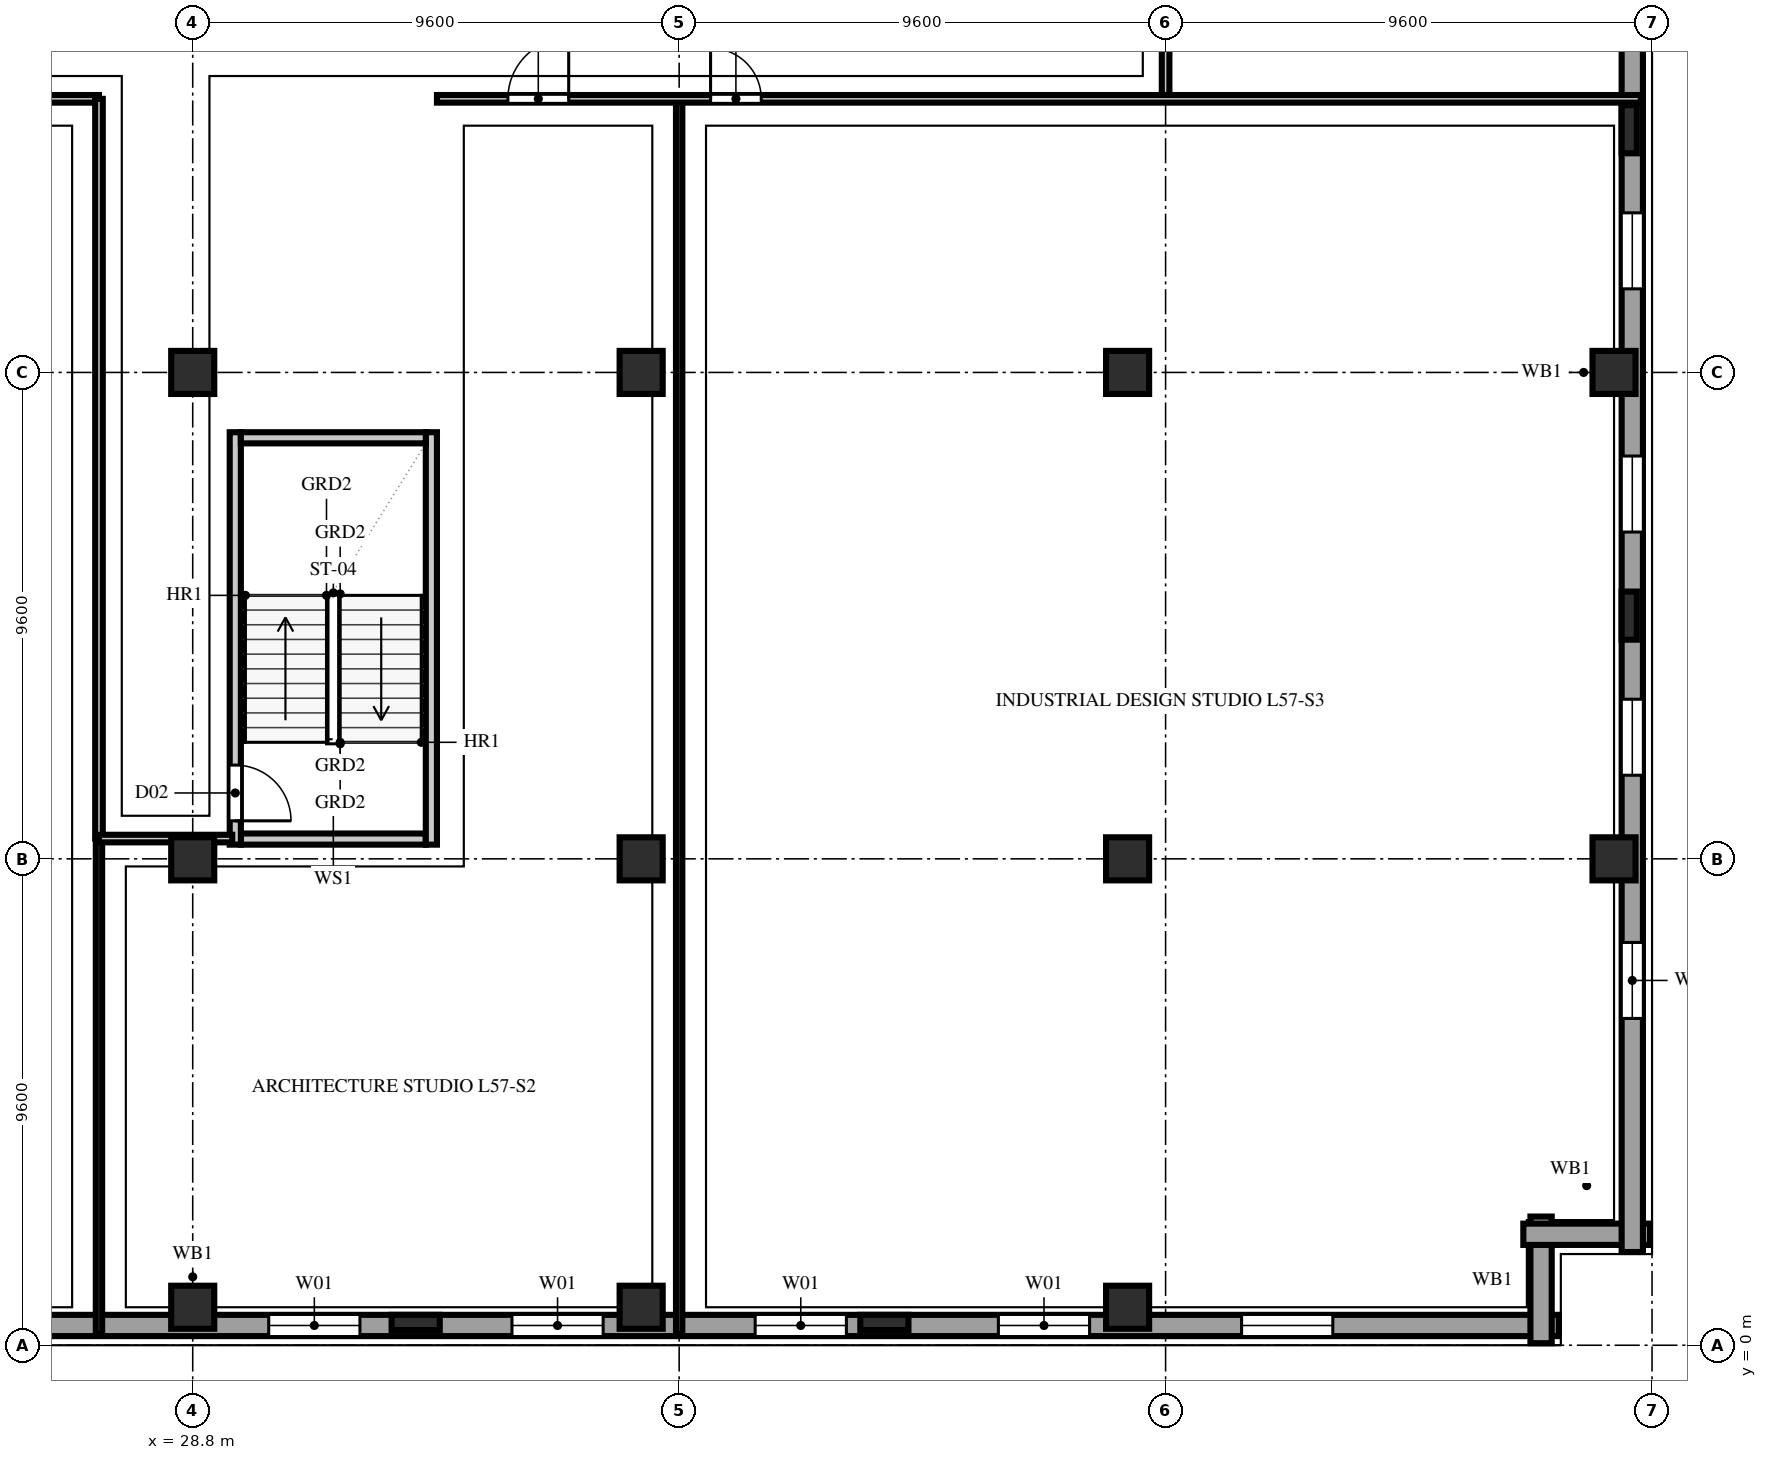
"""IFC4 building model, lengths in metres.
Left out: names, types, materials, properties, quantities, classifications, styles, units other than length and angle.
Written with IfcOpenShell. Run it as: python <this file> out.ifc"""

import sys

from ifc_helpers import new_model, si_unit, direction, frame, frame_2d, origin, origin_2d, place, context, subcontext, project, spatial, rectangle, extrude, element, fill, save


model = new_model("IFC4")
c1 = context("Model", 3, precision=1e-05, world=origin(), true_north=direction((0.0, 1.0)))
c2 = subcontext(c1, "Body", "Model", "MODEL_VIEW")
j1 = project(units=[si_unit("LENGTHUNIT", "METRE"), si_unit("PLANEANGLEUNIT", "RADIAN")], contexts=[c1])
p1 = place(None, origin())
s1 = spatial("IfcSite", under=j1, at=p1, CompositionType="ELEMENT")
p2 = place(p1, origin())
s2 = spatial("IfcBuilding", under=s1, at=p2, CompositionType="ELEMENT")
p3 = place(p2, frame((0.0, 0.0, 225.6)))
s3 = spatial("IfcBuildingStorey", under=s2, at=p3, CompositionType="ELEMENT", Elevation=225.6)
for number, where, z_axis, x_axis in (
    (1, (28.8, 0.75, 0.0), (0.0, 0.0, 1.0), (1.0, 0.0, 0.0)),
    (2, (28.8, 9.6, 0.0), (0.0, 0.0, 1.0), (1.0, 0.0, 0.0)),
    (3, (28.8, 19.2, 0.0), (0.0, 0.0, 1.0), (1.0, 0.0, 0.0)),
    (4, (37.65, 0.75, 0.0), (0.0, 0.0, 1.0), (1.0, 0.0, 0.0)),
    (5, (37.65, 9.6, 0.0), (0.0, 0.0, 1.0), (1.0, 0.0, 0.0)),
    (6, (37.65, 19.2, 0.0), (0.0, 0.0, 1.0), (1.0, 0.0, 0.0)),
    (7, (47.25, 0.75, 0.0), (0.0, 0.0, 1.0), (1.0, 0.0, 0.0)),
    (8, (47.25, 9.6, 0.0), (0.0, 0.0, 1.0), (1.0, 0.0, 0.0)),
    (9, (47.25, 19.2, 0.0), (0.0, 0.0, 1.0), (1.0, 0.0, 0.0)),
    (10, (56.85, 9.6, 0.0), (0.0, 0.0, 1.0), (1.0, 0.0, 0.0)),
    (11, (56.85, 19.2, 0.0), (0.0, 0.0, 1.0), (1.0, 0.0, 0.0)),
):
    element("IfcColumn", number, at=place(p3, frame(where, z_axis=z_axis, x_axis=x_axis)), inside=s3, PredefinedType="COLUMN", context=c2, shape_type="SweptSolid", body=[
        extrude(rectangle(XDim=0.85, YDim=0.85, at=origin_2d()), origin(), (0.0, 0.0, 1.0), 3.8),
    ])
for number, where, z_axis, x_axis in (
    (12, (33.2, 0.45, 0.0), (0.0, 0.0, 1.0), (1.0, 0.0, 0.0)),
    (13, (42.45, 0.45, 0.0), (0.0, 0.0, 1.0), (1.0, 0.0, 0.0)),
    (14, (57.15, 14.4, 0.0), (0.0, 0.0, 1.0), (0.0, 1.0, 0.0)),
    (15, (57.15, 24.0, 0.0), (0.0, 0.0, 1.0), (0.0, 1.0, 0.0)),
):
    element("IfcColumn", number, at=place(p3, frame(where, z_axis=z_axis, x_axis=x_axis)), inside=s3, PredefinedType="PILASTER", context=c2, shape_type="SweptSolid", body=[
        extrude(rectangle(XDim=0.95, YDim=0.3, at=origin_2d()), origin(), (0.0, 0.0, 1.0), 3.8),
    ])
p4 = place(p3, frame((1.84, 0.39, 0.0), z_axis=(0.0, 0.0, 1.0), x_axis=(1.0, 0.0, 0.0)))
e16 = element("IfcWall", 16, at=p4, inside=s3, PredefinedType="SOLIDWALL", context=c2, shape_type="SweptSolid", body=[
    extrude(rectangle(XDim=53.92, YDim=0.42, at=frame_2d((26.96, 0.0))), origin(), (0.0, 0.0, 1.0), 3.54),
])
p5 = place(p4, frame((4.46, 0.0, 0.85)))
e17 = element("IfcOpeningElement", 17, at=p5, cuts=e16, PredefinedType="OPENING", context=c2, shape_type="SweptSolid", body=[
    extrude(rectangle(XDim=1.8, YDim=1.85, at=frame_2d((0.9, 0.925))), frame((0.0, 0.222, 0.0), z_axis=(0.0, -1.0, 0.0), x_axis=(1.0, 0.0, 0.0)), (0.0, 0.0, 1.0), 0.444),
])
p6 = place(p4, frame((9.26, 0.0, 0.85)))
e18 = element("IfcOpeningElement", 18, at=p6, cuts=e16, PredefinedType="OPENING", context=c2, shape_type="SweptSolid", body=[
    extrude(rectangle(XDim=1.8, YDim=1.85, at=frame_2d((0.9, 0.925))), frame((0.0, 0.222, 0.0), z_axis=(0.0, -1.0, 0.0), x_axis=(1.0, 0.0, 0.0)), (0.0, 0.0, 1.0), 0.444),
])
p7 = place(p4, frame((18.86, 0.0, 0.85)))
e19 = element("IfcOpeningElement", 19, at=p7, cuts=e16, PredefinedType="OPENING", context=c2, shape_type="SweptSolid", body=[
    extrude(rectangle(XDim=1.8, YDim=1.85, at=frame_2d((0.9, 0.925))), frame((0.0, 0.222, 0.0), z_axis=(0.0, -1.0, 0.0), x_axis=(1.0, 0.0, 0.0)), (0.0, 0.0, 1.0), 0.444),
])
p8 = place(p4, frame((28.46, 0.0, 0.85)))
e20 = element("IfcOpeningElement", 20, at=p8, cuts=e16, PredefinedType="OPENING", context=c2, shape_type="SweptSolid", body=[
    extrude(rectangle(XDim=1.8, YDim=1.85, at=frame_2d((0.9, 0.925))), frame((0.0, 0.222, 0.0), z_axis=(0.0, -1.0, 0.0), x_axis=(1.0, 0.0, 0.0)), (0.0, 0.0, 1.0), 0.444),
])
p9 = place(p4, frame((33.26, 0.0, 0.85)))
e21 = element("IfcOpeningElement", 21, at=p9, cuts=e16, PredefinedType="OPENING", context=c2, shape_type="SweptSolid", body=[
    extrude(rectangle(XDim=1.8, YDim=1.85, at=frame_2d((0.9, 0.925))), frame((0.0, 0.222, 0.0), z_axis=(0.0, -1.0, 0.0), x_axis=(1.0, 0.0, 0.0)), (0.0, 0.0, 1.0), 0.444),
])
p10 = place(p4, frame((38.06, 0.0, 0.85)))
e22 = element("IfcOpeningElement", 22, at=p10, cuts=e16, PredefinedType="OPENING", context=c2, shape_type="SweptSolid", body=[
    extrude(rectangle(XDim=1.8, YDim=1.85, at=frame_2d((0.9, 0.925))), frame((0.0, 0.222, 0.0), z_axis=(0.0, -1.0, 0.0), x_axis=(1.0, 0.0, 0.0)), (0.0, 0.0, 1.0), 0.444),
])
p11 = place(p4, frame((42.86, 0.0, 0.85)))
e23 = element("IfcOpeningElement", 23, at=p11, cuts=e16, PredefinedType="OPENING", context=c2, shape_type="SweptSolid", body=[
    extrude(rectangle(XDim=1.8, YDim=1.85, at=frame_2d((0.9, 0.925))), frame((0.0, 0.222, 0.0), z_axis=(0.0, -1.0, 0.0), x_axis=(1.0, 0.0, 0.0)), (0.0, 0.0, 1.0), 0.444),
])
p12 = place(p4, frame((47.66, 0.0, 0.85)))
e24 = element("IfcOpeningElement", 24, at=p12, cuts=e16, PredefinedType="OPENING", context=c2, shape_type="SweptSolid", body=[
    extrude(rectangle(XDim=1.8, YDim=1.85, at=frame_2d((0.9, 0.925))), frame((0.0, 0.222, 0.0), z_axis=(0.0, -1.0, 0.0), x_axis=(1.0, 0.0, 0.0)), (0.0, 0.0, 1.0), 0.444),
])
for number, where, z_axis, x_axis in (
    (25, (55.41, 0.04, 0.0), (0.0, 0.0, 1.0), (0.0, 1.0, 0.0)),
    (26, (55.06, 2.19, 0.0), (0.0, 0.0, 1.0), (1.0, 0.0, 0.0)),
):
    element("IfcWall", number, at=place(p3, frame(where, z_axis=z_axis, x_axis=x_axis)), inside=s3, PredefinedType="SOLIDWALL", context=c2, shape_type="SweptSolid", body=[
        extrude(rectangle(XDim=2.5, YDim=0.42, at=frame_2d((1.25, 0.0))), origin(), (0.0, 0.0, 1.0), 3.54),
    ])
p13 = place(p3, frame((57.21, 1.84, 0.0), z_axis=(0.0, 0.0, 1.0), x_axis=(0.0, 1.0, 0.0)))
e27 = element("IfcWall", 27, at=p13, inside=s3, PredefinedType="SOLIDWALL", context=c2, shape_type="SweptSolid", body=[
    extrude(rectangle(XDim=34.72, YDim=0.42, at=frame_2d((17.36, 0.0))), origin(), (0.0, 0.0, 1.0), 3.54),
])
p14 = place(p13, frame((4.61, 0.0, 0.85)))
e28 = element("IfcOpeningElement", 28, at=p14, cuts=e27, PredefinedType="OPENING", context=c2, shape_type="SweptSolid", body=[
    extrude(rectangle(XDim=1.5, YDim=1.85, at=frame_2d((0.75, 0.925))), frame((0.0, 0.222, 0.0), z_axis=(0.0, -1.0, 0.0), x_axis=(1.0, 0.0, 0.0)), (0.0, 0.0, 1.0), 0.444),
])
p15 = place(p13, frame((9.41, 0.0, 0.85)))
e29 = element("IfcOpeningElement", 29, at=p15, cuts=e27, PredefinedType="OPENING", context=c2, shape_type="SweptSolid", body=[
    extrude(rectangle(XDim=1.5, YDim=1.85, at=frame_2d((0.75, 0.925))), frame((0.0, 0.222, 0.0), z_axis=(0.0, -1.0, 0.0), x_axis=(1.0, 0.0, 0.0)), (0.0, 0.0, 1.0), 0.444),
])
p16 = place(p13, frame((14.21, 0.0, 0.85)))
e30 = element("IfcOpeningElement", 30, at=p16, cuts=e27, PredefinedType="OPENING", context=c2, shape_type="SweptSolid", body=[
    extrude(rectangle(XDim=1.5, YDim=1.85, at=frame_2d((0.75, 0.925))), frame((0.0, 0.222, 0.0), z_axis=(0.0, -1.0, 0.0), x_axis=(1.0, 0.0, 0.0)), (0.0, 0.0, 1.0), 0.444),
])
p17 = place(p13, frame((19.01, 0.0, 0.85)))
e31 = element("IfcOpeningElement", 31, at=p17, cuts=e27, PredefinedType="OPENING", context=c2, shape_type="SweptSolid", body=[
    extrude(rectangle(XDim=1.5, YDim=1.85, at=frame_2d((0.75, 0.925))), frame((0.0, 0.222, 0.0), z_axis=(0.0, -1.0, 0.0), x_axis=(1.0, 0.0, 0.0)), (0.0, 0.0, 1.0), 0.444),
])
p18 = place(p13, frame((28.61, 0.0, 0.85)))
e32 = element("IfcOpeningElement", 32, at=p18, cuts=e27, PredefinedType="OPENING", context=c2, shape_type="SweptSolid", body=[
    extrude(rectangle(XDim=1.5, YDim=1.85, at=frame_2d((0.75, 0.925))), frame((0.0, 0.222, 0.0), z_axis=(0.0, -1.0, 0.0), x_axis=(1.0, 0.0, 0.0)), (0.0, 0.0, 1.0), 0.444),
])
p19 = place(p3, frame((29.75, 9.99, 0.0), z_axis=(0.0, 0.0, 1.0), x_axis=(1.0, 0.0, 0.0)))
e33 = element("IfcWall", 33, at=p19, inside=s3, PredefinedType="SOLIDWALL", context=c2, shape_type="SweptSolid", body=[
    extrude(rectangle(XDim=3.65, YDim=0.22, at=frame_2d((1.825, 0.0))), origin(), (0.0, 0.0, 1.0), 3.54),
])
p20 = place(p3, frame((29.64, 9.88, 0.0), z_axis=(0.0, 0.0, 1.0), x_axis=(0.0, 1.0, 0.0)))
e34 = element("IfcWall", 34, at=p20, inside=s3, PredefinedType="SOLIDWALL", context=c2, shape_type="SweptSolid", body=[
    extrude(rectangle(XDim=8.14, YDim=0.22, at=frame_2d((4.07, 0.0))), origin(), (0.0, 0.0, 1.0), 3.54),
])
p21 = place(p20, frame((0.47, 0.0, 0.0)))
e35 = element("IfcOpeningElement", 35, at=p21, cuts=e34, PredefinedType="OPENING", context=c2, shape_type="SweptSolid", body=[
    extrude(rectangle(XDim=1.1, YDim=2.2, at=frame_2d((0.55, 1.1))), frame((0.0, 0.122, 0.0), z_axis=(0.0, -1.0, 0.0), x_axis=(1.0, 0.0, 0.0)), (0.0, 0.0, 1.0), 0.244),
])
p22 = place(p3, frame((33.51, 9.88, 0.0), z_axis=(0.0, 0.0, 1.0), x_axis=(0.0, 1.0, 0.0)))
e36 = element("IfcWall", 36, at=p22, inside=s3, PredefinedType="SOLIDWALL", context=c2, shape_type="SweptSolid", body=[
    extrude(rectangle(XDim=8.14, YDim=0.22, at=frame_2d((4.07, 0.0))), origin(), (0.0, 0.0, 1.0), 3.54),
])
p23 = place(p3, frame((29.75, 17.91, 0.0), z_axis=(0.0, 0.0, 1.0), x_axis=(1.0, 0.0, 0.0)))
e37 = element("IfcWall", 37, at=p23, inside=s3, PredefinedType="SOLIDWALL", context=c2, shape_type="SweptSolid", body=[
    extrude(rectangle(XDim=3.65, YDim=0.22, at=frame_2d((1.825, 0.0))), origin(), (0.0, 0.0, 1.0), 3.54),
])
p24 = place(p3, frame((48.0, 24.6, 0.0), z_axis=(0.0, 0.0, 1.0), x_axis=(0.0, 1.0, 0.0)))
e38 = element("IfcWall", 38, at=p24, inside=s3, PredefinedType="PARTITIONING", context=c2, shape_type="SweptSolid", body=[
    extrude(rectangle(XDim=2.1, YDim=0.15, at=frame_2d((1.05, 0.0))), origin(), (0.0, 0.0, 1.0), 3.54),
])
p25 = place(p3, frame((19.2, 24.6, 0.0), z_axis=(0.0, 0.0, 1.0), x_axis=(1.0, 0.0, 0.0)))
e39 = element("IfcWall", 39, at=p25, inside=s3, PredefinedType="PARTITIONING", context=c2, shape_type="SweptSolid", body=[
    extrude(rectangle(XDim=7.75, YDim=0.15, at=frame_2d((3.875, 0.0))), origin(), (0.0, 0.0, 1.0), 3.54),
])
p26 = place(p25, frame((2.8, 0.0, 0.0)))
e40 = element("IfcOpeningElement", 40, at=p26, cuts=e39, PredefinedType="OPENING", context=c2, shape_type="SweptSolid", body=[
    extrude(rectangle(XDim=1.0, YDim=2.2, at=frame_2d((0.5, 1.1))), frame((0.0, 0.087, 0.0), z_axis=(0.0, -1.0, 0.0), x_axis=(1.0, 0.0, 0.0)), (0.0, 0.0, 1.0), 0.174),
])
p27 = place(p3, frame((26.95, 0.22, 0.0), z_axis=(0.0, 0.0, 1.0), x_axis=(0.0, 1.0, 0.0)))
e41 = element("IfcWall", 41, at=p27, inside=s3, PredefinedType="PARTITIONING", context=c2, shape_type="SweptSolid", body=[
    extrude(rectangle(XDim=9.78, YDim=0.125, at=frame_2d((4.89, 0.0))), origin(), (0.0, 0.0, 1.0), 3.54),
])
p28 = place(p3, frame((26.95, 10.0, 0.0), z_axis=(0.0, 0.0, 1.0), x_axis=(0.0, 1.0, 0.0)))
e42 = element("IfcWall", 42, at=p28, inside=s3, PredefinedType="PARTITIONING", context=c2, shape_type="SweptSolid", body=[
    extrude(rectangle(XDim=14.6, YDim=0.15, at=frame_2d((7.3, 0.0))), origin(), (0.0, 0.0, 1.0), 3.54),
])
p29 = place(p3, frame((26.95, 10.0, 0.0), z_axis=(0.0, 0.0, 1.0), x_axis=(1.0, 0.0, 0.0)))
e43 = element("IfcWall", 43, at=p29, inside=s3, PredefinedType="PARTITIONING", context=c2, shape_type="SweptSolid", body=[
    extrude(rectangle(XDim=2.63, YDim=0.15, at=frame_2d((1.315, 0.0))), origin(), (0.0, 0.0, 1.0), 3.54),
])
p30 = place(p3, frame((38.4, 0.22, 0.0), z_axis=(0.0, 0.0, 1.0), x_axis=(0.0, 1.0, 0.0)))
e44 = element("IfcWall", 44, at=p30, inside=s3, PredefinedType="PARTITIONING", context=c2, shape_type="SweptSolid", body=[
    extrude(rectangle(XDim=24.38, YDim=0.125, at=frame_2d((12.19, 0.0))), origin(), (0.0, 0.0, 1.0), 3.54),
])
p31 = place(p3, frame((33.62, 24.6, 0.0), z_axis=(0.0, 0.0, 1.0), x_axis=(1.0, 0.0, 0.0)))
e45 = element("IfcWall", 45, at=p31, inside=s3, PredefinedType="PARTITIONING", context=c2, shape_type="SweptSolid", body=[
    extrude(rectangle(XDim=23.76, YDim=0.15, at=frame_2d((11.88, 0.0))), origin(), (0.0, 0.0, 1.0), 3.54),
])
p32 = place(p31, frame((1.4, 0.0, 0.0)))
e46 = element("IfcOpeningElement", 46, at=p32, cuts=e45, PredefinedType="OPENING", context=c2, shape_type="SweptSolid", body=[
    extrude(rectangle(XDim=1.2, YDim=2.2, at=frame_2d((0.6, 1.1))), frame((0.0, 0.087, 0.0), z_axis=(0.0, -1.0, 0.0), x_axis=(1.0, 0.0, 0.0)), (0.0, 0.0, 1.0), 0.174),
])
p33 = place(p31, frame((5.4, 0.0, 0.0)))
e47 = element("IfcOpeningElement", 47, at=p33, cuts=e45, PredefinedType="OPENING", context=c2, shape_type="SweptSolid", body=[
    extrude(rectangle(XDim=1.0, YDim=2.2, at=frame_2d((0.5, 1.1))), frame((0.0, 0.087, 0.0), z_axis=(0.0, -1.0, 0.0), x_axis=(1.0, 0.0, 0.0)), (0.0, 0.0, 1.0), 0.174),
])
p34 = place(p8, origin())
e48 = element("IfcWindow", 48, at=p34, inside=s3, PartitioningType="DOUBLE_PANEL_VERTICAL", PredefinedType="WINDOW", context=c2, shape_type="SweptSolid", body=[
    extrude(rectangle(XDim=1.8, YDim=1.85, at=frame_2d((0.9, 0.925))), frame((0.0, 0.11, 0.0), z_axis=(0.0, -1.0, 0.0), x_axis=(1.0, 0.0, 0.0)), (0.0, 0.0, 1.0), 0.06),
])
fill(e20, e48)
p35 = place(p9, origin())
e49 = element("IfcWindow", 49, at=p35, inside=s3, PartitioningType="DOUBLE_PANEL_VERTICAL", PredefinedType="WINDOW", context=c2, shape_type="SweptSolid", body=[
    extrude(rectangle(XDim=1.8, YDim=1.85, at=frame_2d((0.9, 0.925))), frame((0.0, 0.11, 0.0), z_axis=(0.0, -1.0, 0.0), x_axis=(1.0, 0.0, 0.0)), (0.0, 0.0, 1.0), 0.06),
])
fill(e21, e49)
p36 = place(p10, origin())
e50 = element("IfcWindow", 50, at=p36, inside=s3, PartitioningType="DOUBLE_PANEL_VERTICAL", PredefinedType="WINDOW", context=c2, shape_type="SweptSolid", body=[
    extrude(rectangle(XDim=1.8, YDim=1.85, at=frame_2d((0.9, 0.925))), frame((0.0, 0.11, 0.0), z_axis=(0.0, -1.0, 0.0), x_axis=(1.0, 0.0, 0.0)), (0.0, 0.0, 1.0), 0.06),
])
fill(e22, e50)
p37 = place(p11, origin())
e51 = element("IfcWindow", 51, at=p37, inside=s3, PartitioningType="DOUBLE_PANEL_VERTICAL", PredefinedType="WINDOW", context=c2, shape_type="SweptSolid", body=[
    extrude(rectangle(XDim=1.8, YDim=1.85, at=frame_2d((0.9, 0.925))), frame((0.0, 0.11, 0.0), z_axis=(0.0, -1.0, 0.0), x_axis=(1.0, 0.0, 0.0)), (0.0, 0.0, 1.0), 0.06),
])
fill(e23, e51)
p38 = place(p12, origin())
e52 = element("IfcWindow", 52, at=p38, inside=s3, PartitioningType="DOUBLE_PANEL_VERTICAL", PredefinedType="WINDOW", context=c2, shape_type="SweptSolid", body=[
    extrude(rectangle(XDim=1.8, YDim=1.85, at=frame_2d((0.9, 0.925))), frame((0.0, 0.11, 0.0), z_axis=(0.0, -1.0, 0.0), x_axis=(1.0, 0.0, 0.0)), (0.0, 0.0, 1.0), 0.06),
])
fill(e24, e52)
p39 = place(p14, origin())
e53 = element("IfcWindow", 53, at=p39, inside=s3, PartitioningType="DOUBLE_PANEL_VERTICAL", PredefinedType="WINDOW", context=c2, shape_type="SweptSolid", body=[
    extrude(rectangle(XDim=1.5, YDim=1.85, at=frame_2d((0.75, 0.925))), frame((0.0, 0.11, 0.0), z_axis=(0.0, -1.0, 0.0), x_axis=(1.0, 0.0, 0.0)), (0.0, 0.0, 1.0), 0.06),
])
fill(e28, e53)
p40 = place(p15, origin())
e54 = element("IfcWindow", 54, at=p40, inside=s3, PartitioningType="DOUBLE_PANEL_VERTICAL", PredefinedType="WINDOW", context=c2, shape_type="SweptSolid", body=[
    extrude(rectangle(XDim=1.5, YDim=1.85, at=frame_2d((0.75, 0.925))), frame((0.0, 0.11, 0.0), z_axis=(0.0, -1.0, 0.0), x_axis=(1.0, 0.0, 0.0)), (0.0, 0.0, 1.0), 0.06),
])
fill(e29, e54)
p41 = place(p16, origin())
e55 = element("IfcWindow", 55, at=p41, inside=s3, PartitioningType="DOUBLE_PANEL_VERTICAL", PredefinedType="WINDOW", context=c2, shape_type="SweptSolid", body=[
    extrude(rectangle(XDim=1.5, YDim=1.85, at=frame_2d((0.75, 0.925))), frame((0.0, 0.11, 0.0), z_axis=(0.0, -1.0, 0.0), x_axis=(1.0, 0.0, 0.0)), (0.0, 0.0, 1.0), 0.06),
])
fill(e30, e55)
p42 = place(p17, origin())
e56 = element("IfcWindow", 56, at=p42, inside=s3, PartitioningType="DOUBLE_PANEL_VERTICAL", PredefinedType="WINDOW", context=c2, shape_type="SweptSolid", body=[
    extrude(rectangle(XDim=1.5, YDim=1.85, at=frame_2d((0.75, 0.925))), frame((0.0, 0.11, 0.0), z_axis=(0.0, -1.0, 0.0), x_axis=(1.0, 0.0, 0.0)), (0.0, 0.0, 1.0), 0.06),
])
fill(e31, e56)
p43 = place(p21, frame((1.1, 0.0, 0.0), z_axis=(0.0, 0.0, 1.0), x_axis=(-1.0, 0.0, 0.0)))
e57 = element("IfcDoor", 57, at=p43, inside=s3, OperationType="SINGLE_SWING_RIGHT", PredefinedType="DOOR", context=c2, shape_type="SweptSolid", body=[
    extrude(rectangle(XDim=1.1, YDim=2.2, at=frame_2d((0.55, 1.1))), frame((0.0, 0.025, 0.0), z_axis=(0.0, -1.0, 0.0), x_axis=(1.0, 0.0, 0.0)), (0.0, 0.0, 1.0), 0.05),
])
fill(e35, e57)
p44 = place(p32, origin())
e58 = element("IfcDoor", 58, at=p44, inside=s3, OperationType="SINGLE_SWING_RIGHT", PredefinedType="DOOR", context=c2, shape_type="SweptSolid", body=[
    extrude(rectangle(XDim=1.2, YDim=2.2, at=frame_2d((0.6, 1.1))), frame((0.0, 0.025, 0.0), z_axis=(0.0, -1.0, 0.0), x_axis=(1.0, 0.0, 0.0)), (0.0, 0.0, 1.0), 0.05),
])
fill(e46, e58)
p45 = place(p33, origin())
e59 = element("IfcDoor", 59, at=p45, inside=s3, OperationType="SINGLE_SWING_LEFT", PredefinedType="DOOR", context=c2, shape_type="SweptSolid", body=[
    extrude(rectangle(XDim=1.0, YDim=2.2, at=frame_2d((0.5, 1.1))), frame((0.0, 0.025, 0.0), z_axis=(0.0, -1.0, 0.0), x_axis=(1.0, 0.0, 0.0)), (0.0, 0.0, 1.0), 0.05),
])
fill(e47, e59)
save(model, sys.argv[1])
